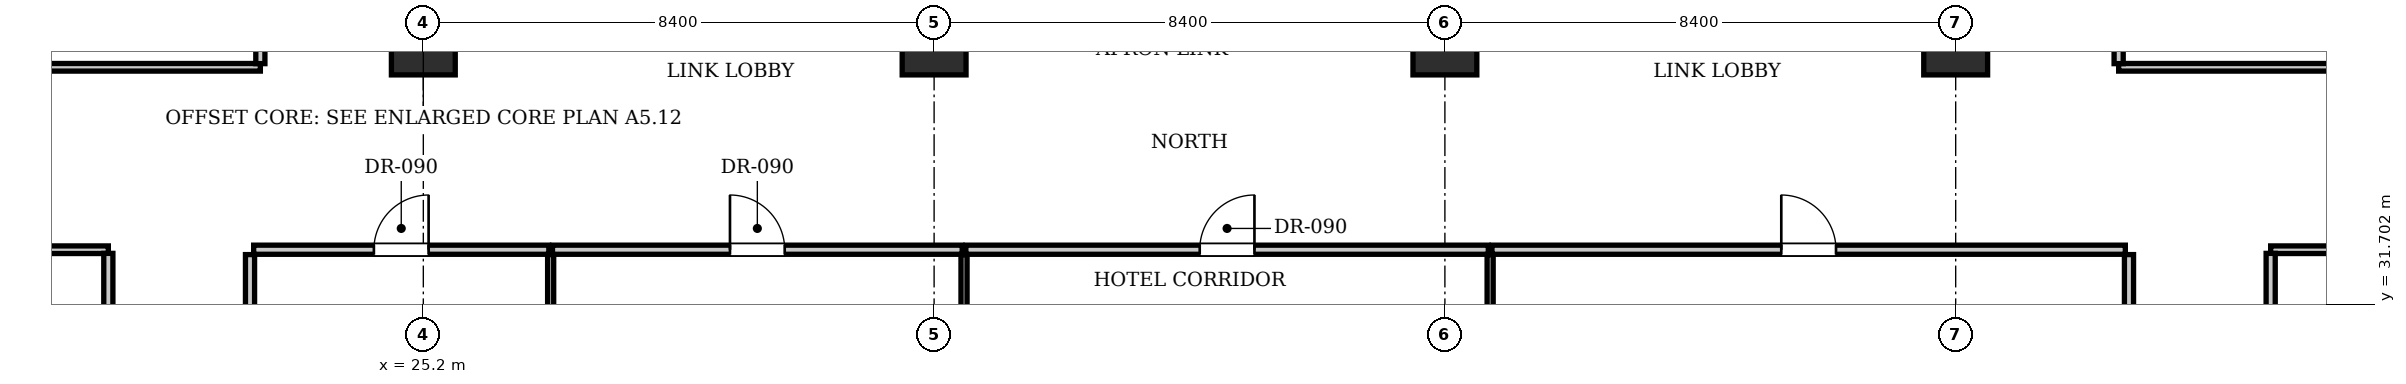
"""IFC4 building model, lengths in metres.
Left out: names, types, materials, properties, quantities, classifications, styles, units other than length and angle.
Written with IfcOpenShell. Run it as: python <this file> out.ifc"""

import sys

from ifc_helpers import new_model, si_unit, direction, frame, frame_2d, origin, origin_2d, place, context, subcontext, project, spatial, rectangle, extrude, element, fill, save


model = new_model("IFC4")
c1 = context("Model", 3, precision=1e-05, world=origin(), true_north=direction((0.0, 1.0)))
c2 = subcontext(c1, "Body", "Model", "MODEL_VIEW")
j1 = project(units=[si_unit("LENGTHUNIT", "METRE"), si_unit("PLANEANGLEUNIT", "RADIAN")], contexts=[c1])
p1 = place(None, origin())
s1 = spatial("IfcSite", under=j1, at=p1, CompositionType="ELEMENT")
p2 = place(p1, origin())
s2 = spatial("IfcBuilding", under=s1, at=p2, CompositionType="ELEMENT")
p3 = place(p2, frame((0.0, 0.0, 65.45)))
s3 = spatial("IfcBuildingStorey", under=s2, at=p3, CompositionType="ELEMENT", Elevation=65.45)
for number, where, z_axis, x_axis in (
    (1, (25.2, 36.0, 0.0), (0.0, 0.0, 1.0), (1.0, 0.0, 0.0)),
    (2, (33.6, 36.0, 0.0), (0.0, 0.0, 1.0), (1.0, 0.0, 0.0)),
    (3, (42.0, 36.0, 0.0), (0.0, 0.0, 1.0), (1.0, 0.0, 0.0)),
    (4, (50.4, 36.0, 0.0), (0.0, 0.0, 1.0), (1.0, 0.0, 0.0)),
):
    element("IfcColumn", number, at=place(p3, frame(where, z_axis=z_axis, x_axis=x_axis)), inside=s3, PredefinedType="COLUMN", context=c2, shape_type="SweptSolid", body=[
        extrude(rectangle(XDim=1.05, YDim=1.05, at=origin_2d()), origin(), (0.0, 0.0, 1.0), 3.85),
    ])
for number, where, z_axis, x_axis in (
    (5, (22.35, 24.19, 0.0), (0.0, 0.0, 1.0), (0.0, 1.0, 0.0)),
    (6, (53.25, 24.19, 0.0), (0.0, 0.0, 1.0), (0.0, 1.0, 0.0)),
):
    element("IfcWall", number, at=place(p3, frame(where, z_axis=z_axis, x_axis=x_axis)), inside=s3, PredefinedType="PARTITIONING", context=c2, shape_type="SweptSolid", body=[
        extrude(rectangle(XDim=8.33, YDim=0.15, at=frame_2d((4.165, 0.0))), origin(), (0.0, 0.0, 1.0), 3.61),
    ])
p4 = place(p3, frame((22.41, 32.6, 0.0), z_axis=(0.0, 0.0, 1.0), x_axis=(1.0, 0.0, 0.0)))
e7 = element("IfcWall", 7, at=p4, inside=s3, PredefinedType="PARTITIONING", context=c2, shape_type="SweptSolid", body=[
    extrude(rectangle(XDim=4.854, YDim=0.15, at=frame_2d((2.427, 0.0))), origin(), (0.0, 0.0, 1.0), 3.61),
])
p5 = place(p4, frame((1.977, 0.0, 0.0)))
e8 = element("IfcOpeningElement", 8, at=p5, cuts=e7, PredefinedType="OPENING", context=c2, shape_type="SweptSolid", body=[
    extrude(rectangle(XDim=0.9, YDim=2.1, at=frame_2d((0.45, 1.05))), frame((0.0, 0.085, 0.0), z_axis=(0.0, -1.0, 0.0), x_axis=(1.0, 0.0, 0.0)), (0.0, 0.0, 1.0), 0.17),
])
p6 = place(p3, frame((27.294, 24.19, 0.0), z_axis=(0.0, 0.0, 1.0), x_axis=(0.0, 1.0, 0.0)))
e9 = element("IfcWall", 9, at=p6, inside=s3, PredefinedType="PARTITIONING", context=c2, shape_type="SweptSolid", body=[
    extrude(rectangle(XDim=8.33, YDim=0.1, at=frame_2d((4.165, 0.0))), origin(), (0.0, 0.0, 1.0), 3.61),
])
p7 = place(p3, frame((27.324, 32.6, 0.0), z_axis=(0.0, 0.0, 1.0), x_axis=(1.0, 0.0, 0.0)))
e10 = element("IfcWall", 10, at=p7, inside=s3, PredefinedType="PARTITIONING", context=c2, shape_type="SweptSolid", body=[
    extrude(rectangle(XDim=6.738, YDim=0.15, at=frame_2d((3.369, 0.0))), origin(), (0.0, 0.0, 1.0), 3.61),
])
p8 = place(p7, frame((2.919, 0.0, 0.0)))
e11 = element("IfcOpeningElement", 11, at=p8, cuts=e10, PredefinedType="OPENING", context=c2, shape_type="SweptSolid", body=[
    extrude(rectangle(XDim=0.9, YDim=2.1, at=frame_2d((0.45, 1.05))), frame((0.0, 0.085, 0.0), z_axis=(0.0, -1.0, 0.0), x_axis=(1.0, 0.0, 0.0)), (0.0, 0.0, 1.0), 0.17),
])
p9 = place(p3, frame((34.092, 24.19, 0.0), z_axis=(0.0, 0.0, 1.0), x_axis=(0.0, 1.0, 0.0)))
e12 = element("IfcWall", 12, at=p9, inside=s3, PredefinedType="PARTITIONING", context=c2, shape_type="SweptSolid", body=[
    extrude(rectangle(XDim=8.33, YDim=0.1, at=frame_2d((4.165, 0.0))), origin(), (0.0, 0.0, 1.0), 3.61),
])
p10 = place(p3, frame((34.122, 32.6, 0.0), z_axis=(0.0, 0.0, 1.0), x_axis=(1.0, 0.0, 0.0)))
e13 = element("IfcWall", 13, at=p10, inside=s3, PredefinedType="PARTITIONING", context=c2, shape_type="SweptSolid", body=[
    extrude(rectangle(XDim=8.592, YDim=0.15, at=frame_2d((4.296, 0.0))), origin(), (0.0, 0.0, 1.0), 3.61),
])
p11 = place(p10, frame((3.846, 0.0, 0.0)))
e14 = element("IfcOpeningElement", 14, at=p11, cuts=e13, PredefinedType="OPENING", context=c2, shape_type="SweptSolid", body=[
    extrude(rectangle(XDim=0.9, YDim=2.1, at=frame_2d((0.45, 1.05))), frame((0.0, 0.085, 0.0), z_axis=(0.0, -1.0, 0.0), x_axis=(1.0, 0.0, 0.0)), (0.0, 0.0, 1.0), 0.17),
])
p12 = place(p3, frame((42.744, 24.19, 0.0), z_axis=(0.0, 0.0, 1.0), x_axis=(0.0, 1.0, 0.0)))
e15 = element("IfcWall", 15, at=p12, inside=s3, PredefinedType="PARTITIONING", context=c2, shape_type="SweptSolid", body=[
    extrude(rectangle(XDim=8.33, YDim=0.1, at=frame_2d((4.165, 0.0))), origin(), (0.0, 0.0, 1.0), 3.61),
])
p13 = place(p3, frame((42.774, 32.6, 0.0), z_axis=(0.0, 0.0, 1.0), x_axis=(1.0, 0.0, 0.0)))
e16 = element("IfcWall", 16, at=p13, inside=s3, PredefinedType="PARTITIONING", context=c2, shape_type="SweptSolid", body=[
    extrude(rectangle(XDim=10.416, YDim=0.15, at=frame_2d((5.208, 0.0))), origin(), (0.0, 0.0, 1.0), 3.61),
])
p14 = place(p13, frame((4.758, 0.0, 0.0)))
e17 = element("IfcOpeningElement", 17, at=p14, cuts=e16, PredefinedType="OPENING", context=c2, shape_type="SweptSolid", body=[
    extrude(rectangle(XDim=0.9, YDim=2.1, at=frame_2d((0.45, 1.05))), frame((0.0, 0.085, 0.0), z_axis=(0.0, -1.0, 0.0), x_axis=(1.0, 0.0, 0.0)), (0.0, 0.0, 1.0), 0.17),
])
p15 = place(p3, frame((10.9, 32.6, 0.0), z_axis=(0.0, 0.0, 1.0), x_axis=(1.0, 0.0, 0.0)))
e18 = element("IfcWall", 18, at=p15, inside=s3, PredefinedType="PARTITIONING", context=c2, shape_type="SweptSolid", body=[
    extrude(rectangle(XDim=9.12, YDim=0.125, at=frame_2d((4.56, 0.0))), origin(), (0.0, 0.0, 1.0), 3.61),
])
p16 = place(p3, frame((55.58, 32.6, 0.0), z_axis=(0.0, 0.0, 1.0), x_axis=(1.0, 0.0, 0.0)))
e19 = element("IfcWall", 19, at=p16, inside=s3, PredefinedType="PARTITIONING", context=c2, shape_type="SweptSolid", body=[
    extrude(rectangle(XDim=9.12, YDim=0.125, at=frame_2d((4.56, 0.0))), origin(), (0.0, 0.0, 1.0), 3.61),
])
for number, where, z_axis, x_axis in (
    (20, (20.02, 30.25, 0.0), (0.0, 0.0, 1.0), (0.0, 1.0, 0.0)),
    (21, (55.58, 30.25, 0.0), (0.0, 0.0, 1.0), (0.0, 1.0, 0.0)),
):
    element("IfcWall", number, at=place(p3, frame(where, z_axis=z_axis, x_axis=x_axis)), inside=s3, PredefinedType="PARTITIONING", context=c2, shape_type="SweptSolid", body=[
        extrude(rectangle(XDim=2.29, YDim=0.15, at=frame_2d((1.145, 0.0))), origin(), (0.0, 0.0, 1.0), 3.61),
    ])
p17 = place(p3, frame((10.9, 35.6, 0.0), z_axis=(0.0, 0.0, 1.0), x_axis=(1.0, 0.0, 0.0)))
e22 = element("IfcWall", 22, at=p17, inside=s3, PredefinedType="PARTITIONING", context=c2, shape_type="SweptSolid", body=[
    extrude(rectangle(XDim=11.62, YDim=0.125, at=frame_2d((5.81, 0.0))), origin(), (0.0, 0.0, 1.0), 3.61),
])
p18 = place(p3, frame((53.08, 35.6, 0.0), z_axis=(0.0, 0.0, 1.0), x_axis=(1.0, 0.0, 0.0)))
e23 = element("IfcWall", 23, at=p18, inside=s3, PredefinedType="PARTITIONING", context=c2, shape_type="SweptSolid", body=[
    extrude(rectangle(XDim=11.62, YDim=0.125, at=frame_2d((5.81, 0.0))), origin(), (0.0, 0.0, 1.0), 3.61),
])
p19 = place(p3, frame((22.52, 35.66, 0.0), z_axis=(0.0, 0.0, 1.0), x_axis=(0.0, 1.0, 0.0)))
e24 = element("IfcWall", 24, at=p19, inside=s3, PredefinedType="PARTITIONING", context=c2, shape_type="SweptSolid", body=[
    extrude(rectangle(XDim=12.328, YDim=0.15, at=frame_2d((6.164, 0.0))), origin(), (0.0, 0.0, 1.0), 3.61),
])
p20 = place(p19, frame((5.689, 0.0, 0.0)))
e25 = element("IfcOpeningElement", 25, at=p20, cuts=e24, PredefinedType="OPENING", context=c2, shape_type="SweptSolid", body=[
    extrude(rectangle(XDim=0.95, YDim=2.15, at=frame_2d((0.475, 1.075))), frame((0.0, 0.085, 0.0), z_axis=(0.0, -1.0, 0.0), x_axis=(1.0, 0.0, 0.0)), (0.0, 0.0, 1.0), 0.17),
])
p21 = place(p3, frame((53.08, 35.66, 0.0), z_axis=(0.0, 0.0, 1.0), x_axis=(0.0, 1.0, 0.0)))
e26 = element("IfcWall", 26, at=p21, inside=s3, PredefinedType="PARTITIONING", context=c2, shape_type="SweptSolid", body=[
    extrude(rectangle(XDim=12.328, YDim=0.15, at=frame_2d((6.164, 0.0))), origin(), (0.0, 0.0, 1.0), 3.61),
])
p22 = place(p21, frame((5.689, 0.0, 0.0)))
e27 = element("IfcOpeningElement", 27, at=p22, cuts=e26, PredefinedType="OPENING", context=c2, shape_type="SweptSolid", body=[
    extrude(rectangle(XDim=0.95, YDim=2.15, at=frame_2d((0.475, 1.075))), frame((0.0, 0.085, 0.0), z_axis=(0.0, -1.0, 0.0), x_axis=(1.0, 0.0, 0.0)), (0.0, 0.0, 1.0), 0.17),
])
p23 = place(p5, origin())
e28 = element("IfcDoor", 28, at=p23, inside=s3, OperationType="SINGLE_SWING_RIGHT", PredefinedType="DOOR", context=c2, shape_type="SweptSolid", body=[
    extrude(rectangle(XDim=0.9, YDim=2.1, at=frame_2d((0.45, 1.05))), frame((0.0, 0.025, 0.0), z_axis=(0.0, -1.0, 0.0), x_axis=(1.0, 0.0, 0.0)), (0.0, 0.0, 1.0), 0.05),
])
fill(e8, e28)
p24 = place(p8, origin())
e29 = element("IfcDoor", 29, at=p24, inside=s3, OperationType="SINGLE_SWING_LEFT", PredefinedType="DOOR", context=c2, shape_type="SweptSolid", body=[
    extrude(rectangle(XDim=0.9, YDim=2.1, at=frame_2d((0.45, 1.05))), frame((0.0, 0.025, 0.0), z_axis=(0.0, -1.0, 0.0), x_axis=(1.0, 0.0, 0.0)), (0.0, 0.0, 1.0), 0.05),
])
fill(e11, e29)
p25 = place(p11, origin())
e30 = element("IfcDoor", 30, at=p25, inside=s3, OperationType="SINGLE_SWING_RIGHT", PredefinedType="DOOR", context=c2, shape_type="SweptSolid", body=[
    extrude(rectangle(XDim=0.9, YDim=2.1, at=frame_2d((0.45, 1.05))), frame((0.0, 0.025, 0.0), z_axis=(0.0, -1.0, 0.0), x_axis=(1.0, 0.0, 0.0)), (0.0, 0.0, 1.0), 0.05),
])
fill(e14, e30)
p26 = place(p14, origin())
e31 = element("IfcDoor", 31, at=p26, inside=s3, OperationType="SINGLE_SWING_LEFT", PredefinedType="DOOR", context=c2, shape_type="SweptSolid", body=[
    extrude(rectangle(XDim=0.9, YDim=2.1, at=frame_2d((0.45, 1.05))), frame((0.0, 0.025, 0.0), z_axis=(0.0, -1.0, 0.0), x_axis=(1.0, 0.0, 0.0)), (0.0, 0.0, 1.0), 0.05),
])
fill(e17, e31)
save(model, sys.argv[1])
